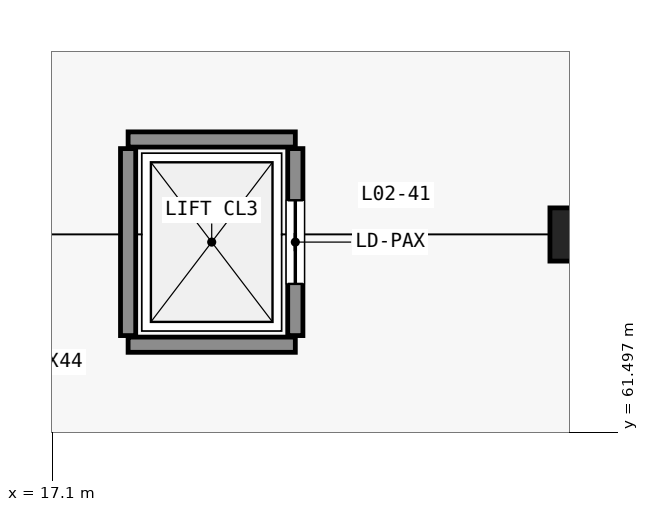
"""IFC4 building model, lengths in metres.
Left out: names, types, materials, properties, quantities, classifications, styles, units other than length and angle.
Written with IfcOpenShell. Run it as: python <this file> out.ifc"""

import sys

from ifc_helpers import new_model, si_unit, direction, frame, frame_2d, origin, origin_2d, place, context, subcontext, project, spatial, rectangle, extrude, element, fill, save


model = new_model("IFC4")
c1 = context("Model", 3, precision=1e-05, world=origin(), true_north=direction((0.0, 1.0)))
c2 = subcontext(c1, "Body", "Model", "MODEL_VIEW")
j1 = project(units=[si_unit("LENGTHUNIT", "METRE"), si_unit("PLANEANGLEUNIT", "RADIAN")], contexts=[c1])
p1 = place(None, origin())
s1 = spatial("IfcSite", under=j1, at=p1, CompositionType="ELEMENT")
p2 = place(p1, origin())
s2 = spatial("IfcBuilding", under=s1, at=p2, CompositionType="ELEMENT")
p3 = place(p2, frame((0.0, 0.0, 11.4)))
s3 = spatial("IfcBuildingStorey", under=s2, at=p3, CompositionType="ELEMENT", Elevation=11.4)
p4 = place(p3, frame((24.0, 64.1, 0.0), z_axis=(0.0, 0.0, 1.0), x_axis=(1.0, 0.0, 0.0)))
e1 = element("IfcColumn", 1, at=p4, inside=s3, PredefinedType="COLUMN", context=c2, shape_type="SweptSolid", body=[
    extrude(rectangle(XDim=0.7, YDim=0.7, at=origin_2d()), origin(), (0.0, 0.0, 1.0), 3.7),
])
for number, where, z_axis, x_axis in (
    (2, (18.1, 62.65, 0.0), (0.0, 0.0, 1.0), (1.0, 0.0, 0.0)),
    (3, (18.1, 65.35, 0.0), (0.0, 0.0, 1.0), (1.0, 0.0, 0.0)),
):
    element("IfcWall", number, at=place(p3, frame(where, z_axis=z_axis, x_axis=x_axis)), inside=s3, PredefinedType="STANDARD", context=c2, shape_type="SweptSolid", body=[
        extrude(rectangle(XDim=2.2, YDim=0.2, at=frame_2d((1.1, 0.0))), origin(), (0.0, 0.0, 1.0), 4.45),
    ])
p5 = place(p3, frame((18.1, 62.77, 0.0), z_axis=(0.0, 0.0, 1.0), x_axis=(0.0, 1.0, 0.0)))
e4 = element("IfcWall", 4, at=p5, inside=s3, PredefinedType="STANDARD", context=c2, shape_type="SweptSolid", body=[
    extrude(rectangle(XDim=2.46, YDim=0.2, at=frame_2d((1.23, 0.0))), origin(), (0.0, 0.0, 1.0), 4.45),
])
p6 = place(p3, frame((20.3, 62.77, 0.0), z_axis=(0.0, 0.0, 1.0), x_axis=(0.0, 1.0, 0.0)))
e5 = element("IfcWall", 5, at=p6, inside=s3, PredefinedType="STANDARD", context=c2, shape_type="SweptSolid", body=[
    extrude(rectangle(XDim=2.46, YDim=0.2, at=frame_2d((1.23, 0.0))), origin(), (0.0, 0.0, 1.0), 4.45),
])
p7 = place(p6, frame((0.68, 0.0, 0.0)))
e6 = element("IfcOpeningElement", 6, at=p7, cuts=e5, PredefinedType="OPENING", context=c2, shape_type="SweptSolid", body=[
    extrude(rectangle(XDim=1.1, YDim=2.15, at=frame_2d((0.55, 1.075))), frame((0.0, 0.11, 0.0), z_axis=(0.0, -1.0, 0.0), x_axis=(1.0, 0.0, 0.0)), (0.0, 0.0, 1.0), 0.22),
])
p8 = place(p7, origin())
e7 = element("IfcDoor", 7, at=p8, inside=s3, OperationType="SLIDING_TO_LEFT", PredefinedType="DOOR", context=c2, shape_type="SweptSolid", body=[
    extrude(rectangle(XDim=1.1, YDim=2.15, at=frame_2d((0.55, 1.075))), frame((0.0, 0.025, 0.0), z_axis=(0.0, -1.0, 0.0), x_axis=(1.0, 0.0, 0.0)), (0.0, 0.0, 1.0), 0.05),
])
fill(e6, e7)
save(model, sys.argv[1])
